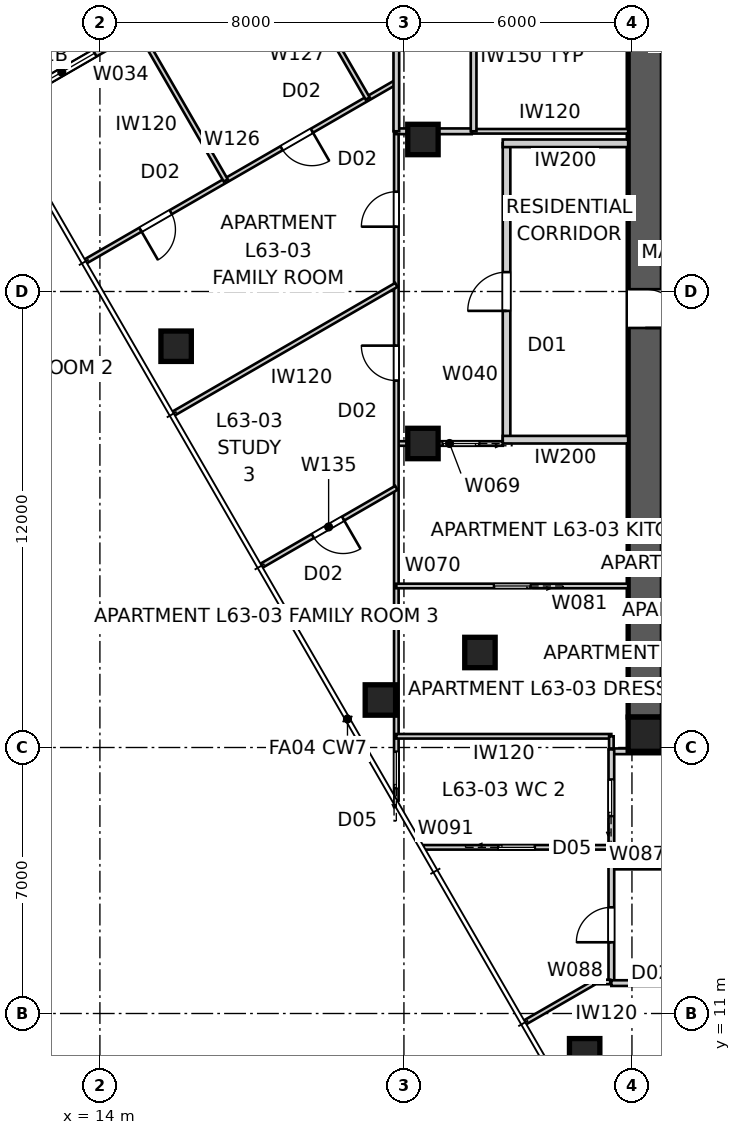
"""IFC4 building model, lengths in metres.
Left out: names, types, materials, properties, quantities, classifications, styles, units other than length and angle.
Written with IfcOpenShell. Run it as: python <this file> out.ifc"""

import sys

from ifc_helpers import new_model, si_unit, direction, frame, frame_2d, origin, origin_2d, place, context, subcontext, project, spatial, polyline, rectangle, outline, extrude, element, fill, save


model = new_model("IFC4")
c1 = context("Model", 3, precision=1e-05, world=origin(), true_north=direction((0.0, 1.0)))
c2 = subcontext(c1, "Body", "Model", "MODEL_VIEW")
j1 = project(units=[si_unit("LENGTHUNIT", "METRE"), si_unit("PLANEANGLEUNIT", "RADIAN")], contexts=[c1])
p1 = place(None, origin())
s1 = spatial("IfcSite", under=j1, at=p1, CompositionType="ELEMENT")
p2 = place(p1, origin())
s2 = spatial("IfcBuilding", under=s1, at=p2, CompositionType="ELEMENT")
p3 = place(p2, frame((0.0, 0.0, 228.6)))
s3 = spatial("IfcBuildingStorey", under=s2, at=p3, CompositionType="ELEMENT", Elevation=228.6)
p4 = place(p3, frame((51.2, 18.35, 0.0), z_axis=(0.0, 0.0, 1.0), x_axis=(-1.0, 0.0, 0.0)))
e1 = element("IfcWall", 1, at=p4, inside=s3, PredefinedType="SHEAR", context=c2, shape_type="SweptSolid", body=[
    extrude(outline(polyline([(0.0, -0.45), (22.4, -0.45), (22.4, -0.025), (22.85, -0.025), (22.85, 0.025), (22.4, 0.025), (22.4, 0.45), (0.0, 0.45), (0.0, 0.025), (-0.45, 0.025), (-0.45, -0.025), (0.0, -0.025), (0.0, -0.45)])), origin(), (0.0, 0.0, 1.0), 3.4),
])
p5 = place(p3, frame((28.35, 41.2, 0.0), z_axis=(0.0, 0.0, 1.0), x_axis=(0.0, -1.0, 0.0)))
e2 = element("IfcWall", 2, at=p5, inside=s3, PredefinedType="SHEAR", context=c2, shape_type="SweptSolid", body=[
    extrude(outline(polyline([(0.0, -0.45), (22.4, -0.45), (22.4, -0.025), (22.85, -0.025), (22.85, 0.025), (22.4, 0.025), (22.4, 0.45), (0.0, 0.45), (0.0, 0.025), (-0.45, 0.025), (-0.45, -0.025), (0.0, -0.025), (0.0, -0.45)])), origin(), (0.0, 0.0, 1.0), 3.4),
])
p6 = place(p5, frame((11.14, 0.0, 0.0)))
e3 = element("IfcOpeningElement", 3, at=p6, cuts=e2, PredefinedType="OPENING", context=c2, shape_type="SweptSolid", body=[
    extrude(rectangle(XDim=1.02, YDim=2.4, at=frame_2d((0.51, 1.2))), frame((0.0, 0.46, 0.0), z_axis=(0.0, -1.0, 0.0), x_axis=(1.0, 0.0, 0.0)), (0.0, 0.0, 1.0), 0.92),
])
p7 = place(p3, frame((28.35, 18.35, 0.0), z_axis=(0.0, 0.0, 1.0), x_axis=(1.0, 0.0, 0.0)))
e4 = element("IfcColumn", 4, at=p7, inside=s3, PredefinedType="COLUMN", context=c2, shape_type="SweptSolid", body=[
    extrude(rectangle(XDim=0.9, YDim=0.9, at=origin_2d()), origin(), (0.0, 0.0, 1.0), 3.4),
])
for number, where, z_axis, x_axis in (
    (5, (16.005, 28.56, 0.0), (0.0, 0.0, 1.0), (1.0, 0.0, 0.0)),
    (6, (21.38, 19.25, 0.0), (0.0, 0.0, 1.0), (1.0, 0.0, 0.0)),
    (7, (26.755, 9.94, 0.0), (0.0, 0.0, 1.0), (1.0, 0.0, 0.0)),
    (8, (22.5, 34.0, 0.0), (0.0, 0.0, 1.0), (1.0, 0.0, 0.0)),
    (9, (22.5, 26.0, 0.0), (0.0, 0.0, 1.0), (1.0, 0.0, 0.0)),
    (10, (24.0, 20.5, 0.0), (0.0, 0.0, 1.0), (1.0, 0.0, 0.0)),
):
    element("IfcColumn", number, at=place(p3, frame(where, z_axis=z_axis, x_axis=x_axis)), inside=s3, PredefinedType="COLUMN", context=c2, shape_type="SweptSolid", body=[
        extrude(rectangle(XDim=0.8, YDim=0.8, at=origin_2d()), origin(), (0.0, 0.0, 1.0), 3.4),
    ])
p8 = place(p3, frame((14.729, 36.771, 0.0), z_axis=(0.0, 0.0, 1.0), x_axis=(-0.866026010844, -0.49999894854, 0.0)))
e11 = element("IfcWall", 11, at=p8, inside=s3, PredefinedType="SOLIDWALL", context=c2, shape_type="SweptSolid", body=[
    extrude(rectangle(XDim=4.0, YDim=0.2, at=frame_2d((2.0, 0.0))), origin(), (0.0, 0.0, 1.0), 3.25),
])
p9 = place(p8, frame((1.0, 0.0, 0.45)))
e12 = element("IfcOpeningElement", 12, at=p9, cuts=e11, PredefinedType="OPENING", context=c2, shape_type="SweptSolid", body=[
    extrude(rectangle(XDim=2.0, YDim=1.8, at=frame_2d((1.0, 0.9))), frame((0.0, 0.11, 0.0), z_axis=(0.0, -1.0, 0.0), x_axis=(1.0, 0.0, 0.0)), (0.0, 0.0, 1.0), 0.22),
])
p10 = place(p3, frame((24.7, 26.1, 0.0), z_axis=(0.0, 0.0, 1.0), x_axis=(0.0, 1.0, 0.0)))
e13 = element("IfcWall", 13, at=p10, inside=s3, PredefinedType="PARTITIONING", context=c2, shape_type="SweptSolid", body=[
    extrude(rectangle(XDim=7.8, YDim=0.2, at=frame_2d((3.9, 0.0))), origin(), (0.0, 0.0, 1.0), 3.25),
])
p11 = place(p10, frame((3.39, 0.0, 0.0)))
e14 = element("IfcOpeningElement", 14, at=p11, cuts=e13, PredefinedType="OPENING", context=c2, shape_type="SweptSolid", body=[
    extrude(rectangle(XDim=1.02, YDim=2.34, at=frame_2d((0.51, 1.17))), frame((0.0, 0.11, 0.0), z_axis=(0.0, -1.0, 0.0), x_axis=(1.0, 0.0, 0.0)), (0.0, 0.0, 1.0), 0.22),
])
for number, where, z_axis, x_axis in (
    (15, (27.9, 33.9, 0.0), (0.0, 0.0, 1.0), (-1.0, 0.0, 0.0)),
    (16, (27.9, 26.1, 0.0), (0.0, 0.0, 1.0), (-1.0, 0.0, 0.0)),
):
    element("IfcWall", number, at=place(p3, frame(where, z_axis=z_axis, x_axis=x_axis)), inside=s3, PredefinedType="PARTITIONING", context=c2, shape_type="SweptSolid", body=[
        extrude(rectangle(XDim=3.3, YDim=0.2, at=frame_2d((1.65, 0.0))), origin(), (0.0, 0.0, 1.0), 3.25),
    ])
p12 = place(p3, frame((23.783, 34.216, 0.0), z_axis=(0.0, 0.0, 1.0), x_axis=(1.0, 0.0, 0.0)))
e17 = element("IfcWall", 17, at=p12, inside=s3, PredefinedType="PARTITIONING", context=c2, shape_type="SweptSolid", body=[
    extrude(rectangle(XDim=4.117, YDim=0.12, at=frame_2d((2.058, 0.0))), origin(), (0.0, 0.0, 1.0), 3.25),
])
p13 = place(p3, frame((24.6, 26.0, 0.0), z_axis=(0.0, 0.0, 1.0), x_axis=(-1.0, 0.0, 0.0)))
e18 = element("IfcWall", 18, at=p13, inside=s3, PredefinedType="PARTITIONING", context=c2, shape_type="SweptSolid", body=[
    extrude(rectangle(XDim=2.8, YDim=0.12, at=frame_2d((1.4, 0.0))), origin(), (0.0, 0.0, 1.0), 3.25),
])
p14 = place(p13, frame((0.62, 0.0, 0.0)))
e19 = element("IfcOpeningElement", 19, at=p14, cuts=e18, PredefinedType="OPENING", context=c2, shape_type="SweptSolid", body=[
    extrude(rectangle(XDim=0.96, YDim=2.1, at=frame_2d((0.48, 1.05))), frame((0.0, 0.07, 0.0), z_axis=(0.0, -1.0, 0.0), x_axis=(1.0, 0.0, 0.0)), (0.0, 0.0, 1.0), 0.14),
])
p15 = place(p3, frame((21.8, 16.603, 0.0), z_axis=(0.0, 0.0, 1.0), x_axis=(0.0, 1.0, 0.0)))
e20 = element("IfcWall", 20, at=p15, inside=s3, PredefinedType="PARTITIONING", context=c2, shape_type="SweptSolid", body=[
    extrude(rectangle(XDim=17.613, YDim=0.12, at=frame_2d((8.806, 0.0))), origin(), (0.0, 0.0, 1.0), 3.25),
])
p16 = place(p15, frame((11.052, 0.0, 0.0)))
e21 = element("IfcOpeningElement", 21, at=p16, cuts=e20, PredefinedType="OPENING", context=c2, shape_type="SweptSolid", body=[
    extrude(rectangle(XDim=0.92, YDim=2.34, at=frame_2d((0.46, 1.17))), frame((0.0, 0.07, 0.0), z_axis=(0.0, -1.0, 0.0), x_axis=(1.0, 0.0, 0.0)), (0.0, 0.0, 1.0), 0.14),
])
p17 = place(p15, frame((15.102, 0.0, 0.0)))
e22 = element("IfcOpeningElement", 22, at=p17, cuts=e20, PredefinedType="OPENING", context=c2, shape_type="SweptSolid", body=[
    extrude(rectangle(XDim=0.92, YDim=2.34, at=frame_2d((0.46, 1.17))), frame((0.0, 0.07, 0.0), z_axis=(0.0, -1.0, 0.0), x_axis=(1.0, 0.0, 0.0)), (0.0, 0.0, 1.0), 0.14),
])
p18 = place(p15, frame((0.326, 0.0, 0.0)))
e23 = element("IfcOpeningElement", 23, at=p18, cuts=e20, PredefinedType="OPENING", context=c2, shape_type="SweptSolid", body=[
    extrude(rectangle(XDim=0.96, YDim=2.1, at=frame_2d((0.48, 1.05))), frame((0.0, 0.07, 0.0), z_axis=(0.0, -1.0, 0.0), x_axis=(1.0, 0.0, 0.0)), (0.0, 0.0, 1.0), 0.14),
])
p19 = place(p3, frame((21.8, 34.216, 0.0), z_axis=(0.0, 0.0, 1.0), x_axis=(1.0, 0.0, 0.0)))
e24 = element("IfcWall", 24, at=p19, inside=s3, PredefinedType="SOLIDWALL", context=c2, shape_type="SweptSolid", body=[
    extrude(rectangle(XDim=1.983, YDim=0.15, at=frame_2d((0.992, 0.0))), origin(), (0.0, 0.0, 1.0), 3.25),
])
p20 = place(p3, frame((23.833, 34.216, 0.0), z_axis=(0.0, 0.0, 1.0), x_axis=(0.0, 1.0, 0.0)))
e25 = element("IfcWall", 25, at=p20, inside=s3, PredefinedType="SOLIDWALL", context=c2, shape_type="SweptSolid", body=[
    extrude(rectangle(XDim=3.923, YDim=0.15, at=frame_2d((1.961, 0.0))), origin(), (0.0, 0.0, 1.0), 3.25),
])
p21 = place(p3, frame((27.9, 22.25, 0.0), z_axis=(0.0, 0.0, 1.0), x_axis=(-1.0, 0.0, 0.0)))
e26 = element("IfcWall", 26, at=p21, inside=s3, PredefinedType="PARTITIONING", context=c2, shape_type="SweptSolid", body=[
    extrude(rectangle(XDim=6.1, YDim=0.12, at=frame_2d((3.05, 0.0))), origin(), (0.0, 0.0, 1.0), 3.25),
])
p22 = place(p21, frame((2.57, 0.0, 0.0)))
e27 = element("IfcOpeningElement", 27, at=p22, cuts=e26, PredefinedType="OPENING", context=c2, shape_type="SweptSolid", body=[
    extrude(rectangle(XDim=0.96, YDim=2.1, at=frame_2d((0.48, 1.05))), frame((0.0, 0.07, 0.0), z_axis=(0.0, -1.0, 0.0), x_axis=(1.0, 0.0, 0.0)), (0.0, 0.0, 1.0), 0.14),
])
p23 = place(p3, frame((27.458, 18.295, 0.0), z_axis=(0.0, 0.0, 1.0), x_axis=(-1.0, 0.0, 0.0)))
e28 = element("IfcWall", 28, at=p23, inside=s3, PredefinedType="PARTITIONING", context=c2, shape_type="SweptSolid", body=[
    extrude(rectangle(XDim=5.658, YDim=0.12, at=frame_2d((2.829, 0.0))), origin(), (0.0, 0.0, 1.0), 3.25),
])
p24 = place(p3, frame((28.8, 17.9, 0.0), z_axis=(0.0, 0.0, 1.0), x_axis=(-1.0, 0.0, 0.0)))
e29 = element("IfcWall", 29, at=p24, inside=s3, PredefinedType="SOLIDWALL", context=c2, shape_type="SweptSolid", body=[
    extrude(rectangle(XDim=1.342, YDim=0.15, at=frame_2d((0.671, 0.0))), origin(), (0.0, 0.0, 1.0), 3.25),
])
p25 = place(p3, frame((32.361, 14.869, 0.0), z_axis=(0.0, 0.0, 1.0), x_axis=(-1.0, 0.0, 0.0)))
e30 = element("IfcWall", 30, at=p25, inside=s3, PredefinedType="SOLIDWALL", context=c2, shape_type="SweptSolid", body=[
    extrude(rectangle(XDim=4.903, YDim=0.15, at=frame_2d((2.452, 0.0))), origin(), (0.0, 0.0, 1.0), 3.25),
])
p26 = place(p3, frame((27.458, 11.8, 0.0), z_axis=(0.0, 0.0, 1.0), x_axis=(0.0, 1.0, 0.0)))
e31 = element("IfcWall", 31, at=p26, inside=s3, PredefinedType="SOLIDWALL", context=c2, shape_type="SweptSolid", body=[
    extrude(rectangle(XDim=6.15, YDim=0.15, at=frame_2d((3.075, 0.0))), origin(), (0.0, 0.0, 1.0), 3.25),
])
p27 = place(p26, frame((4.396, 0.0, 0.0)))
e32 = element("IfcOpeningElement", 32, at=p27, cuts=e31, PredefinedType="OPENING", context=c2, shape_type="SweptSolid", body=[
    extrude(rectangle(XDim=0.96, YDim=2.1, at=frame_2d((0.48, 1.05))), frame((0.0, 0.085, 0.0), z_axis=(0.0, -1.0, 0.0), x_axis=(1.0, 0.0, 0.0)), (0.0, 0.0, 1.0), 0.17),
])
p28 = place(p26, frame((1.074, 0.0, 0.0)))
e33 = element("IfcOpeningElement", 33, at=p28, cuts=e31, PredefinedType="OPENING", context=c2, shape_type="SweptSolid", body=[
    extrude(rectangle(XDim=0.92, YDim=2.34, at=frame_2d((0.46, 1.17))), frame((0.0, 0.085, 0.0), z_axis=(0.0, -1.0, 0.0), x_axis=(1.0, 0.0, 0.0)), (0.0, 0.0, 1.0), 0.17),
])
p29 = place(p3, frame((32.361, 11.8, 0.0), z_axis=(0.0, 0.0, 1.0), x_axis=(-1.0, 0.0, 0.0)))
e34 = element("IfcWall", 34, at=p29, inside=s3, PredefinedType="SOLIDWALL", context=c2, shape_type="SweptSolid", body=[
    extrude(rectangle(XDim=4.903, YDim=0.15, at=frame_2d((2.452, 0.0))), origin(), (0.0, 0.0, 1.0), 3.25),
])
p30 = place(p29, frame((1.992, 0.0, 0.0)))
e35 = element("IfcOpeningElement", 35, at=p30, cuts=e34, PredefinedType="OPENING", context=c2, shape_type="SweptSolid", body=[
    extrude(rectangle(XDim=0.92, YDim=2.34, at=frame_2d((0.46, 1.17))), frame((0.0, 0.085, 0.0), z_axis=(0.0, -1.0, 0.0), x_axis=(1.0, 0.0, 0.0)), (0.0, 0.0, 1.0), 0.17),
])
p31 = place(p3, frame((22.51, 15.373, 0.0), z_axis=(0.0, 0.0, 1.0), x_axis=(1.0, 0.0, 0.0)))
e36 = element("IfcWall", 36, at=p31, inside=s3, PredefinedType="PARTITIONING", context=c2, shape_type="SweptSolid", body=[
    extrude(rectangle(XDim=4.918, YDim=0.12, at=frame_2d((2.459, 0.0))), origin(), (0.0, 0.0, 1.0), 3.25),
])
p32 = place(p31, frame((1.973, 0.0, 0.0)))
e37 = element("IfcOpeningElement", 37, at=p32, cuts=e36, PredefinedType="OPENING", context=c2, shape_type="SweptSolid", body=[
    extrude(rectangle(XDim=0.96, YDim=2.1, at=frame_2d((0.48, 1.05))), frame((0.0, 0.07, 0.0), z_axis=(0.0, -1.0, 0.0), x_axis=(1.0, 0.0, 0.0)), (0.0, 0.0, 1.0), 0.14),
])
p33 = place(p3, frame((27.428, 11.83, 0.0), z_axis=(0.0, 0.0, 1.0), x_axis=(-1.0, 0.0, 0.0)))
e38 = element("IfcWall", 38, at=p33, inside=s3, PredefinedType="PARTITIONING", context=c2, shape_type="SweptSolid", body=[
    extrude(rectangle(XDim=0.421, YDim=0.12, at=frame_2d((0.211, 0.0))), origin(), (0.0, 0.0, 1.0), 3.25),
])
p34 = place(p3, frame((26.976, 11.8, 0.0), z_axis=(0.0, 0.0, 1.0), x_axis=(-0.866046860819, -0.499962833484, 0.0)))
e39 = element("IfcWall", 39, at=p34, inside=s3, PredefinedType="PARTITIONING", context=c2, shape_type="SweptSolid", body=[
    extrude(rectangle(XDim=2.081, YDim=0.12, at=frame_2d((1.041, 0.0))), origin(), (0.0, 0.0, 1.0), 3.25),
])
p35 = place(p3, frame((21.8, 35.514, 0.0), z_axis=(0.0, 0.0, 1.0), x_axis=(-0.86602907136, -0.49999364752, 0.0)))
e40 = element("IfcWall", 40, at=p35, inside=s3, PredefinedType="PARTITIONING", context=c2, shape_type="SweptSolid", body=[
    extrude(rectangle(XDim=9.455, YDim=0.12, at=frame_2d((4.728, 0.0))), origin(), (0.0, 0.0, 1.0), 3.25),
])
p36 = place(p35, frame((6.854, 0.0, 0.0)))
e41 = element("IfcOpeningElement", 41, at=p36, cuts=e40, PredefinedType="OPENING", context=c2, shape_type="SweptSolid", body=[
    extrude(rectangle(XDim=0.92, YDim=2.34, at=frame_2d((0.46, 1.17))), frame((0.0, 0.07, 0.0), z_axis=(0.0, -1.0, 0.0), x_axis=(1.0, 0.0, 0.0)), (0.0, 0.0, 1.0), 0.14),
])
p37 = place(p35, frame((2.566, 0.0, 0.0)))
e42 = element("IfcOpeningElement", 42, at=p37, cuts=e40, PredefinedType="OPENING", context=c2, shape_type="SweptSolid", body=[
    extrude(rectangle(XDim=0.92, YDim=2.34, at=frame_2d((0.46, 1.17))), frame((0.0, 0.07, 0.0), z_axis=(0.0, -1.0, 0.0), x_axis=(1.0, 0.0, 0.0)), (0.0, 0.0, 1.0), 0.14),
])
p38 = place(p3, frame((16.754, 42.513, 0.0), z_axis=(0.0, 0.0, 1.0), x_axis=(0.500017009237, -0.866015583274, 0.0)))
e43 = element("IfcWall", 43, at=p38, inside=s3, PredefinedType="PARTITIONING", context=c2, shape_type="SweptSolid", body=[
    extrude(rectangle(XDim=8.586, YDim=0.12, at=frame_2d((4.293, 0.0))), origin(), (0.0, 0.0, 1.0), 3.25),
])
p39 = place(p38, frame((3.813, 0.0, 0.0)))
e44 = element("IfcOpeningElement", 44, at=p39, cuts=e43, PredefinedType="OPENING", context=c2, shape_type="SweptSolid", body=[
    extrude(rectangle(XDim=0.92, YDim=2.34, at=frame_2d((0.46, 1.17))), frame((0.0, 0.07, 0.0), z_axis=(0.0, -1.0, 0.0), x_axis=(1.0, 0.0, 0.0)), (0.0, 0.0, 1.0), 0.14),
])
p40 = place(p3, frame((17.312, 32.922, 0.0), z_axis=(0.0, 0.0, 1.0), x_axis=(-0.499984590049, 0.866034300541, 0.0)))
e45 = element("IfcWall", 45, at=p40, inside=s3, PredefinedType="PARTITIONING", context=c2, shape_type="SweptSolid", body=[
    extrude(rectangle(XDim=4.595, YDim=0.12, at=frame_2d((2.298, 0.0))), origin(), (0.0, 0.0, 1.0), 3.25),
])
p41 = place(p3, frame((21.8, 30.173, 0.0), z_axis=(0.0, 0.0, 1.0), x_axis=(-0.866020204108, -0.500009005995, 0.0)))
e46 = element("IfcWall", 46, at=p41, inside=s3, PredefinedType="PARTITIONING", context=c2, shape_type="SweptSolid", body=[
    extrude(rectangle(XDim=6.785, YDim=0.12, at=frame_2d((3.393, 0.0))), origin(), (0.0, 0.0, 1.0), 3.25),
])
p42 = place(p3, frame((21.8, 39.49, 0.0), z_axis=(0.0, 0.0, 1.0), x_axis=(0.0, -1.0, 0.0)))
e47 = element("IfcWall", 47, at=p42, inside=s3, PredefinedType="SOLIDWALL", context=c2, shape_type="SweptSolid", body=[
    extrude(rectangle(XDim=5.274, YDim=0.15, at=frame_2d((2.637, 0.0))), origin(), (0.0, 0.0, 1.0), 3.25),
])
p43 = place(p42, frame((1.503, 0.0, 0.0)))
e48 = element("IfcOpeningElement", 48, at=p43, cuts=e47, PredefinedType="OPENING", context=c2, shape_type="SweptSolid", body=[
    extrude(rectangle(XDim=0.92, YDim=2.34, at=frame_2d((0.46, 1.17))), frame((0.0, 0.085, 0.0), z_axis=(0.0, -1.0, 0.0), x_axis=(1.0, 0.0, 0.0)), (0.0, 0.0, 1.0), 0.17),
])
p44 = place(p3, frame((21.8, 24.833, 0.0), z_axis=(0.0, 0.0, 1.0), x_axis=(-0.866025520146, -0.499999798456, 0.0)))
e49 = element("IfcWall", 49, at=p44, inside=s3, PredefinedType="PARTITIONING", context=c2, shape_type="SweptSolid", body=[
    extrude(rectangle(XDim=4.115, YDim=0.12, at=frame_2d((2.057, 0.0))), origin(), (0.0, 0.0, 1.0), 3.25),
])
p45 = place(p44, frame((1.617, 0.0, 0.0)))
e50 = element("IfcOpeningElement", 50, at=p45, cuts=e49, PredefinedType="OPENING", context=c2, shape_type="SweptSolid", body=[
    extrude(rectangle(XDim=0.92, YDim=2.34, at=frame_2d((0.46, 1.17))), frame((0.0, 0.07, 0.0), z_axis=(0.0, -1.0, 0.0), x_axis=(1.0, 0.0, 0.0)), (0.0, 0.0, 1.0), 0.14),
])
p46 = place(p3, frame((27.458, 18.295, 0.0), z_axis=(0.0, 0.0, 1.0), x_axis=(0.0, -1.0, 0.0)))
e51 = element("IfcWall", 51, at=p46, inside=s3, PredefinedType="PARTITIONING", context=c2, shape_type="SweptSolid", body=[
    extrude(rectangle(XDim=0.345, YDim=0.12, at=frame_2d((0.172, 0.0))), origin(), (0.0, 0.0, 1.0), 3.25),
])
p47 = place(p9, origin())
e52 = element("IfcWindow", 52, at=p47, inside=s3, PartitioningType="SINGLE_PANEL", PredefinedType="WINDOW", context=c2, shape_type="SweptSolid", body=[
    extrude(rectangle(XDim=2.0, YDim=1.8, at=frame_2d((1.0, 0.9))), frame((0.0, 0.03, 0.0), z_axis=(0.0, -1.0, 0.0), x_axis=(1.0, 0.0, 0.0)), (0.0, 0.0, 1.0), 0.06),
])
fill(e12, e52)
p48 = place(p11, origin())
e53 = element("IfcDoor", 53, at=p48, inside=s3, OperationType="SINGLE_SWING_LEFT", PredefinedType="DOOR", context=c2, shape_type="SweptSolid", body=[
    extrude(rectangle(XDim=1.02, YDim=2.34, at=frame_2d((0.51, 1.17))), frame((0.0, 0.025, 0.0), z_axis=(0.0, -1.0, 0.0), x_axis=(1.0, 0.0, 0.0)), (0.0, 0.0, 1.0), 0.05),
])
fill(e14, e53)
p49 = place(p16, origin())
e54 = element("IfcDoor", 54, at=p49, inside=s3, OperationType="SINGLE_SWING_RIGHT", PredefinedType="DOOR", context=c2, shape_type="SweptSolid", body=[
    extrude(rectangle(XDim=0.92, YDim=2.34, at=frame_2d((0.46, 1.17))), frame((0.0, 0.025, 0.0), z_axis=(0.0, -1.0, 0.0), x_axis=(1.0, 0.0, 0.0)), (0.0, 0.0, 1.0), 0.05),
])
fill(e21, e54)
p50 = place(p17, origin())
e55 = element("IfcDoor", 55, at=p50, inside=s3, OperationType="SINGLE_SWING_LEFT", PredefinedType="DOOR", context=c2, shape_type="SweptSolid", body=[
    extrude(rectangle(XDim=0.92, YDim=2.34, at=frame_2d((0.46, 1.17))), frame((0.0, 0.025, 0.0), z_axis=(0.0, -1.0, 0.0), x_axis=(1.0, 0.0, 0.0)), (0.0, 0.0, 1.0), 0.05),
])
fill(e22, e55)
p51 = place(p14, origin())
e56 = element("IfcDoor", 56, at=p51, inside=s3, OperationType="SLIDING_TO_LEFT", PredefinedType="DOOR", context=c2, shape_type="SweptSolid", body=[
    extrude(rectangle(XDim=0.96, YDim=2.1, at=frame_2d((0.48, 1.05))), frame((0.0, 0.025, 0.0), z_axis=(0.0, -1.0, 0.0), x_axis=(1.0, 0.0, 0.0)), (0.0, 0.0, 1.0), 0.05),
])
fill(e19, e56)
p52 = place(p45, origin())
e57 = element("IfcDoor", 57, at=p52, inside=s3, OperationType="SINGLE_SWING_LEFT", PredefinedType="DOOR", context=c2, shape_type="SweptSolid", body=[
    extrude(rectangle(XDim=0.92, YDim=2.34, at=frame_2d((0.46, 1.17))), frame((0.0, 0.025, 0.0), z_axis=(0.0, -1.0, 0.0), x_axis=(1.0, 0.0, 0.0)), (0.0, 0.0, 1.0), 0.05),
])
fill(e50, e57)
p53 = place(p36, origin())
e58 = element("IfcDoor", 58, at=p53, inside=s3, OperationType="SINGLE_SWING_RIGHT", PredefinedType="DOOR", context=c2, shape_type="SweptSolid", body=[
    extrude(rectangle(XDim=0.92, YDim=2.34, at=frame_2d((0.46, 1.17))), frame((0.0, 0.025, 0.0), z_axis=(0.0, -1.0, 0.0), x_axis=(1.0, 0.0, 0.0)), (0.0, 0.0, 1.0), 0.05),
])
fill(e41, e58)
p54 = place(p37, origin())
e59 = element("IfcDoor", 59, at=p54, inside=s3, OperationType="SINGLE_SWING_LEFT", PredefinedType="DOOR", context=c2, shape_type="SweptSolid", body=[
    extrude(rectangle(XDim=0.92, YDim=2.34, at=frame_2d((0.46, 1.17))), frame((0.0, 0.025, 0.0), z_axis=(0.0, -1.0, 0.0), x_axis=(1.0, 0.0, 0.0)), (0.0, 0.0, 1.0), 0.05),
])
fill(e42, e59)
p55 = place(p22, origin())
e60 = element("IfcDoor", 60, at=p55, inside=s3, OperationType="SLIDING_TO_LEFT", PredefinedType="DOOR", context=c2, shape_type="SweptSolid", body=[
    extrude(rectangle(XDim=0.96, YDim=2.1, at=frame_2d((0.48, 1.05))), frame((0.0, 0.025, 0.0), z_axis=(0.0, -1.0, 0.0), x_axis=(1.0, 0.0, 0.0)), (0.0, 0.0, 1.0), 0.05),
])
fill(e27, e60)
p56 = place(p18, origin())
e61 = element("IfcDoor", 61, at=p56, inside=s3, OperationType="SLIDING_TO_LEFT", PredefinedType="DOOR", context=c2, shape_type="SweptSolid", body=[
    extrude(rectangle(XDim=0.96, YDim=2.1, at=frame_2d((0.48, 1.05))), frame((0.0, 0.025, 0.0), z_axis=(0.0, -1.0, 0.0), x_axis=(1.0, 0.0, 0.0)), (0.0, 0.0, 1.0), 0.05),
])
fill(e23, e61)
p57 = place(p32, origin())
e62 = element("IfcDoor", 62, at=p57, inside=s3, OperationType="SLIDING_TO_LEFT", PredefinedType="DOOR", context=c2, shape_type="SweptSolid", body=[
    extrude(rectangle(XDim=0.96, YDim=2.1, at=frame_2d((0.48, 1.05))), frame((0.0, 0.025, 0.0), z_axis=(0.0, -1.0, 0.0), x_axis=(1.0, 0.0, 0.0)), (0.0, 0.0, 1.0), 0.05),
])
fill(e37, e62)
p58 = place(p27, origin())
e63 = element("IfcDoor", 63, at=p58, inside=s3, OperationType="SLIDING_TO_LEFT", PredefinedType="DOOR", context=c2, shape_type="SweptSolid", body=[
    extrude(rectangle(XDim=0.96, YDim=2.1, at=frame_2d((0.48, 1.05))), frame((0.0, 0.025, 0.0), z_axis=(0.0, -1.0, 0.0), x_axis=(1.0, 0.0, 0.0)), (0.0, 0.0, 1.0), 0.05),
])
fill(e32, e63)
p59 = place(p28, origin())
e64 = element("IfcDoor", 64, at=p59, inside=s3, OperationType="SINGLE_SWING_LEFT", PredefinedType="DOOR", context=c2, shape_type="SweptSolid", body=[
    extrude(rectangle(XDim=0.92, YDim=2.34, at=frame_2d((0.46, 1.17))), frame((0.0, 0.025, 0.0), z_axis=(0.0, -1.0, 0.0), x_axis=(1.0, 0.0, 0.0)), (0.0, 0.0, 1.0), 0.05),
])
fill(e33, e64)
p60 = place(p6, origin())
e65 = element("IfcDoor", 65, at=p60, inside=s3, OperationType="SINGLE_SWING_RIGHT", PredefinedType="DOOR", context=c2, shape_type="SweptSolid", body=[
    extrude(rectangle(XDim=1.02, YDim=2.4, at=frame_2d((0.51, 1.2))), frame((0.0, 0.025, 0.0), z_axis=(0.0, -1.0, 0.0), x_axis=(1.0, 0.0, 0.0)), (0.0, 0.0, 1.0), 0.05),
])
fill(e3, e65)
save(model, sys.argv[1])
